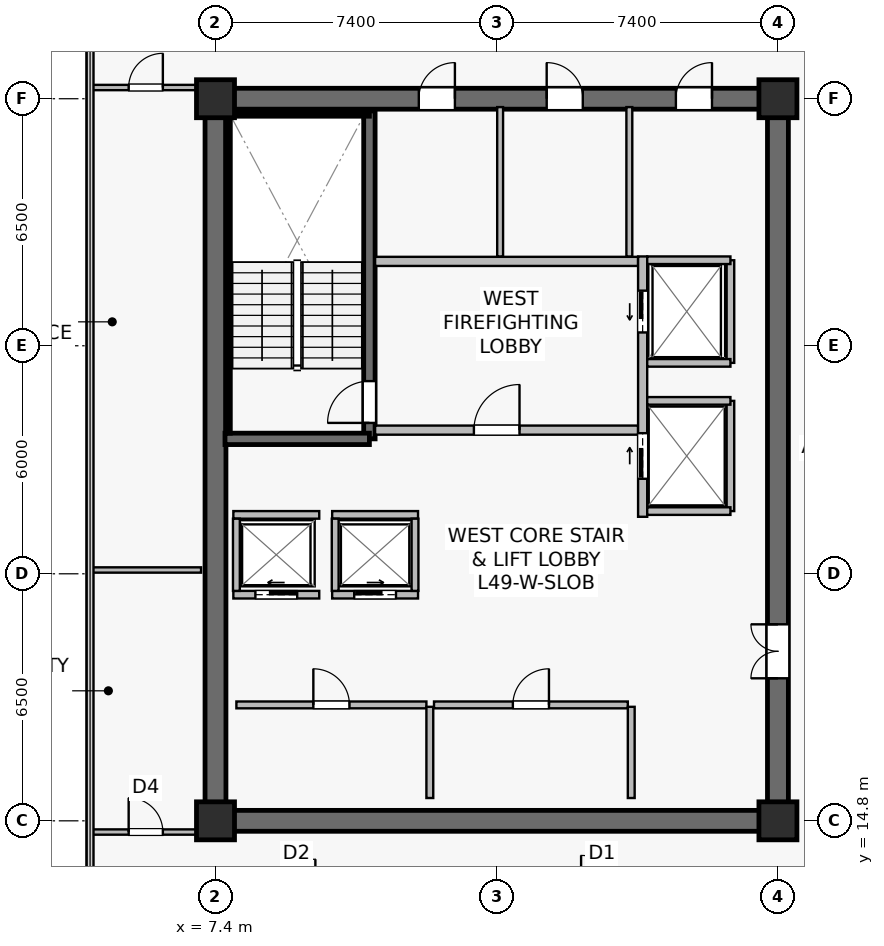
"""IFC4 building model, lengths in metres.
Left out: names, types, materials, properties, quantities, classifications, styles, units other than length and angle.
Written with IfcOpenShell. Run it as: python <this file> out.ifc"""

import sys

from ifc_helpers import new_model, si_unit, direction, frame, frame_2d, origin, origin_2d, place, context, subcontext, project, spatial, rectangle, extrude, source, transform, mapped, element, fill, save


model = new_model("IFC4")
c1 = context("Model", 3, precision=1e-05, world=origin(), true_north=direction((0.0, 1.0)))
c2 = subcontext(c1, "Body", "Model", "MODEL_VIEW")
j1 = project(units=[si_unit("LENGTHUNIT", "METRE"), si_unit("PLANEANGLEUNIT", "RADIAN")], contexts=[c1])
p1 = place(None, origin())
s1 = spatial("IfcSite", under=j1, at=p1, CompositionType="ELEMENT")
p2 = place(p1, origin())
s2 = spatial("IfcBuilding", under=s1, at=p2, CompositionType="ELEMENT")
p3 = place(p2, frame((0.0, 0.0, 205.5)))
s3 = spatial("IfcBuildingStorey", under=s2, at=p3, CompositionType="ELEMENT", Elevation=205.5)
p4 = place(p3, frame((7.125, 14.8, 0.0), z_axis=(0.0, 0.0, 1.0), x_axis=(1.0, 0.0, 0.0)))
e1 = element("IfcWall", 1, at=p4, inside=s3, PredefinedType="SHEAR", context=c2, shape_type="SweptSolid", body=[
    extrude(rectangle(XDim=15.35, YDim=0.55, at=frame_2d((7.675, 0.0))), origin(), (0.0, 0.0, 1.0), 3.8),
])
p5 = place(p3, frame((7.125, 33.8, 0.0), z_axis=(0.0, 0.0, 1.0), x_axis=(1.0, 0.0, 0.0)))
e2 = element("IfcWall", 2, at=p5, inside=s3, PredefinedType="SHEAR", context=c2, shape_type="SweptSolid", body=[
    extrude(rectangle(XDim=15.35, YDim=0.55, at=frame_2d((7.675, 0.0))), origin(), (0.0, 0.0, 1.0), 3.8),
])
p6 = place(p5, frame((5.625, 0.0, 0.0)))
e3 = element("IfcOpeningElement", 3, at=p6, cuts=e2, PredefinedType="OPENING", context=c2, shape_type="SweptSolid", body=[
    extrude(rectangle(XDim=0.95, YDim=2.15, at=frame_2d((0.475, 1.075))), frame((0.0, 0.285, 0.0), z_axis=(0.0, -1.0, 0.0), x_axis=(1.0, 0.0, 0.0)), (0.0, 0.0, 1.0), 0.57),
])
p7 = place(p5, frame((8.99, 0.0, 0.0)))
e4 = element("IfcOpeningElement", 4, at=p7, cuts=e2, PredefinedType="OPENING", context=c2, shape_type="SweptSolid", body=[
    extrude(rectangle(XDim=0.95, YDim=2.15, at=frame_2d((0.475, 1.075))), frame((0.0, 0.285, 0.0), z_axis=(0.0, -1.0, 0.0), x_axis=(1.0, 0.0, 0.0)), (0.0, 0.0, 1.0), 0.57),
])
p8 = place(p5, frame((12.39, 0.0, 0.0)))
e5 = element("IfcOpeningElement", 5, at=p8, cuts=e2, PredefinedType="OPENING", context=c2, shape_type="SweptSolid", body=[
    extrude(rectangle(XDim=0.95, YDim=2.15, at=frame_2d((0.475, 1.075))), frame((0.0, 0.285, 0.0), z_axis=(0.0, -1.0, 0.0), x_axis=(1.0, 0.0, 0.0)), (0.0, 0.0, 1.0), 0.57),
])
p9 = place(p3, frame((7.4, 15.075, 0.0), z_axis=(0.0, 0.0, 1.0), x_axis=(0.0, 1.0, 0.0)))
e6 = element("IfcWall", 6, at=p9, inside=s3, PredefinedType="SHEAR", context=c2, shape_type="SweptSolid", body=[
    extrude(rectangle(XDim=18.45, YDim=0.55, at=frame_2d((9.225, 0.0))), origin(), (0.0, 0.0, 1.0), 3.8),
])
p10 = place(p3, frame((22.2, 15.075, 0.0), z_axis=(0.0, 0.0, 1.0), x_axis=(0.0, 1.0, 0.0)))
e7 = element("IfcWall", 7, at=p10, inside=s3, PredefinedType="SHEAR", context=c2, shape_type="SweptSolid", body=[
    extrude(rectangle(XDim=18.45, YDim=0.55, at=frame_2d((9.225, 0.0))), origin(), (0.0, 0.0, 1.0), 3.8),
])
p11 = place(p10, frame((3.475, 0.0, 0.0)))
e8 = element("IfcOpeningElement", 8, at=p11, cuts=e7, PredefinedType="OPENING", context=c2, shape_type="SweptSolid", body=[
    extrude(rectangle(XDim=1.42, YDim=2.2, at=frame_2d((0.71, 1.1))), frame((0.0, 0.285, 0.0), z_axis=(0.0, -1.0, 0.0), x_axis=(1.0, 0.0, 0.0)), (0.0, 0.0, 1.0), 0.57),
])
p12 = place(p3, frame((11.45, 24.85, 0.0), z_axis=(0.0, 0.0, 1.0), x_axis=(0.0, 1.0, 0.0)))
e9 = element("IfcWall", 9, at=p12, inside=s3, PredefinedType="SHEAR", context=c2, shape_type="SweptSolid", body=[
    extrude(rectangle(XDim=8.63, YDim=0.3, at=frame_2d((4.315, 0.0))), origin(), (0.0, 0.0, 1.0), 3.8),
])
p13 = place(p12, frame((0.42, 0.0, 0.0)))
e10 = element("IfcOpeningElement", 10, at=p13, cuts=e9, PredefinedType="OPENING", context=c2, shape_type="SweptSolid", body=[
    extrude(rectangle(XDim=1.1, YDim=2.15, at=frame_2d((0.55, 1.075))), frame((0.0, 0.16, 0.0), z_axis=(0.0, -1.0, 0.0), x_axis=(1.0, 0.0, 0.0)), (0.0, 0.0, 1.0), 0.32),
])
p14 = place(p3, frame((7.65, 24.85, 0.0), z_axis=(0.0, 0.0, 1.0), x_axis=(1.0, 0.0, 0.0)))
e11 = element("IfcWall", 11, at=p14, inside=s3, PredefinedType="SHEAR", context=c2, shape_type="SweptSolid", body=[
    extrude(rectangle(XDim=3.8, YDim=0.3, at=frame_2d((1.9, 0.0))), origin(), (0.0, 0.0, 1.0), 3.8),
])
p15 = place(p3, frame((7.73, 33.4, 0.0), z_axis=(0.0, 0.0, 1.0), x_axis=(1.0, 0.0, 0.0)))
e12 = element("IfcWall", 12, at=p15, inside=s3, PredefinedType="SOLIDWALL", context=c2, shape_type="SweptSolid", body=[
    extrude(rectangle(XDim=3.72, YDim=0.12, at=frame_2d((1.86, 0.0))), origin(), (0.0, 0.0, 1.0), 3.8),
])
p16 = place(p3, frame((7.73, 25.0, 0.0), z_axis=(0.0, 0.0, 1.0), x_axis=(0.0, 1.0, 0.0)))
e13 = element("IfcWall", 13, at=p16, inside=s3, PredefinedType="SOLIDWALL", context=c2, shape_type="SweptSolid", body=[
    extrude(rectangle(XDim=8.32, YDim=0.12, at=frame_2d((4.16, 0.0))), origin(), (0.0, 0.0, 1.0), 3.8),
])
m1 = source(origin(), c2, "Body", "SweptSolid", [
    extrude(rectangle(XDim=1.0, YDim=1.0, at=origin_2d()), origin(), (0.0, 0.0, 1.0), 4.1),
])
for number, where, z_axis, x_axis in (
    (14, (7.4, 14.8, 0.0), (0.0, 0.0, 1.0), (1.0, 0.0, 0.0)),
    (15, (22.2, 14.8, 0.0), (0.0, 0.0, 1.0), (1.0, 0.0, 0.0)),
    (16, (7.4, 33.8, 0.0), (0.0, 0.0, 1.0), (1.0, 0.0, 0.0)),
    (17, (22.2, 33.8, 0.0), (0.0, 0.0, 1.0), (1.0, 0.0, 0.0)),
):
    element("IfcColumn", number, at=place(p3, frame(where, z_axis=z_axis, x_axis=x_axis)), inside=s3, PredefinedType="COLUMN", context=c2, shape_type="MappedRepresentation", body=[
        mapped(m1, transform((0.0, 0.0, 0.0), scale=1.0)),
    ])
p17 = place(p3, frame((11.6, 25.08, 0.0), z_axis=(0.0, 0.0, 1.0), x_axis=(1.0, 0.0, 0.0)))
e18 = element("IfcWall", 18, at=p17, inside=s3, PredefinedType="SOLIDWALL", context=c2, shape_type="SweptSolid", body=[
    extrude(rectangle(XDim=6.92, YDim=0.24, at=frame_2d((3.46, 0.0))), origin(), (0.0, 0.0, 1.0), 3.197),
])
p18 = place(p17, frame((2.6, 0.0, 0.0)))
e19 = element("IfcOpeningElement", 19, at=p18, cuts=e18, PredefinedType="OPENING", context=c2, shape_type="SweptSolid", body=[
    extrude(rectangle(XDim=1.2, YDim=2.16, at=frame_2d((0.6, 1.08))), frame((0.0, 0.13, 0.0), z_axis=(0.0, -1.0, 0.0), x_axis=(1.0, 0.0, 0.0)), (0.0, 0.0, 1.0), 0.26),
])
p19 = place(p3, frame((11.6, 29.52, 0.0), z_axis=(0.0, 0.0, 1.0), x_axis=(1.0, 0.0, 0.0)))
e20 = element("IfcWall", 20, at=p19, inside=s3, PredefinedType="SOLIDWALL", context=c2, shape_type="SweptSolid", body=[
    extrude(rectangle(XDim=6.92, YDim=0.24, at=frame_2d((3.46, 0.0))), origin(), (0.0, 0.0, 1.0), 3.197),
])
p20 = place(p3, frame((18.64, 22.8, 0.0), z_axis=(0.0, 0.0, 1.0), x_axis=(0.0, 1.0, 0.0)))
e21 = element("IfcWall", 21, at=p20, inside=s3, PredefinedType="SOLIDWALL", context=c2, shape_type="SweptSolid", body=[
    extrude(rectangle(XDim=6.85, YDim=0.24, at=frame_2d((3.425, 0.0))), origin(), (0.0, 0.0, 1.0), 2.935),
])
p21 = place(p20, frame((4.85, 0.0, 0.0)))
e22 = element("IfcOpeningElement", 22, at=p21, cuts=e21, PredefinedType="OPENING", context=c2, shape_type="SweptSolid", body=[
    extrude(rectangle(XDim=1.1, YDim=2.22, at=frame_2d((0.55, 1.11))), frame((0.0, 0.13, 0.0), z_axis=(0.0, -1.0, 0.0), x_axis=(1.0, 0.0, 0.0)), (0.0, 0.0, 1.0), 0.26),
])
p22 = place(p20, frame((1.0, 0.0, 0.0)))
e23 = element("IfcOpeningElement", 23, at=p22, cuts=e21, PredefinedType="OPENING", context=c2, shape_type="SweptSolid", body=[
    extrude(rectangle(XDim=1.2, YDim=2.22, at=frame_2d((0.6, 1.11))), frame((0.0, 0.13, 0.0), z_axis=(0.0, -1.0, 0.0), x_axis=(1.0, 0.0, 0.0)), (0.0, 0.0, 1.0), 0.26),
])
p23 = place(p3, frame((7.87, 20.75, 0.0), z_axis=(0.0, 0.0, 1.0), x_axis=(1.0, 0.0, 0.0)))
e24 = element("IfcWall", 24, at=p23, inside=s3, PredefinedType="SOLIDWALL", context=c2, shape_type="SweptSolid", body=[
    extrude(rectangle(XDim=2.26, YDim=0.2, at=frame_2d((1.13, 0.0))), origin(), (0.0, 0.0, 1.0), 3.8),
])
p24 = place(p23, frame((0.58, 0.0, 0.0)))
e25 = element("IfcOpeningElement", 25, at=p24, cuts=e24, PredefinedType="OPENING", context=c2, shape_type="SweptSolid", body=[
    extrude(rectangle(XDim=1.1, YDim=2.22, at=frame_2d((0.55, 1.11))), frame((0.0, 0.11, 0.0), z_axis=(0.0, -1.0, 0.0), x_axis=(1.0, 0.0, 0.0)), (0.0, 0.0, 1.0), 0.22),
])
p25 = place(p3, frame((7.87, 22.85, 0.0), z_axis=(0.0, 0.0, 1.0), x_axis=(1.0, 0.0, 0.0)))
e26 = element("IfcWall", 26, at=p25, inside=s3, PredefinedType="SOLIDWALL", context=c2, shape_type="SweptSolid", body=[
    extrude(rectangle(XDim=2.26, YDim=0.2, at=frame_2d((1.13, 0.0))), origin(), (0.0, 0.0, 1.0), 3.8),
])
p26 = place(p3, frame((7.95, 20.85, 0.0), z_axis=(0.0, 0.0, 1.0), x_axis=(0.0, 1.0, 0.0)))
e27 = element("IfcWall", 27, at=p26, inside=s3, PredefinedType="SOLIDWALL", context=c2, shape_type="SweptSolid", body=[
    extrude(rectangle(XDim=1.9, YDim=0.18, at=frame_2d((0.95, 0.0))), origin(), (0.0, 0.0, 1.0), 3.8),
])
p27 = place(p3, frame((10.47, 20.75, 0.0), z_axis=(0.0, 0.0, 1.0), x_axis=(1.0, 0.0, 0.0)))
e28 = element("IfcWall", 28, at=p27, inside=s3, PredefinedType="SOLIDWALL", context=c2, shape_type="SweptSolid", body=[
    extrude(rectangle(XDim=2.26, YDim=0.2, at=frame_2d((1.13, 0.0))), origin(), (0.0, 0.0, 1.0), 3.8),
])
p28 = place(p27, frame((0.58, 0.0, 0.0)))
e29 = element("IfcOpeningElement", 29, at=p28, cuts=e28, PredefinedType="OPENING", context=c2, shape_type="SweptSolid", body=[
    extrude(rectangle(XDim=1.1, YDim=2.22, at=frame_2d((0.55, 1.11))), frame((0.0, 0.11, 0.0), z_axis=(0.0, -1.0, 0.0), x_axis=(1.0, 0.0, 0.0)), (0.0, 0.0, 1.0), 0.22),
])
p29 = place(p3, frame((10.47, 22.85, 0.0), z_axis=(0.0, 0.0, 1.0), x_axis=(1.0, 0.0, 0.0)))
e30 = element("IfcWall", 30, at=p29, inside=s3, PredefinedType="SOLIDWALL", context=c2, shape_type="SweptSolid", body=[
    extrude(rectangle(XDim=2.26, YDim=0.2, at=frame_2d((1.13, 0.0))), origin(), (0.0, 0.0, 1.0), 3.8),
])
for number, where, z_axis, x_axis in (
    (31, (10.55, 20.85, 0.0), (0.0, 0.0, 1.0), (0.0, 1.0, 0.0)),
    (32, (12.65, 20.85, 0.0), (0.0, 0.0, 1.0), (0.0, 1.0, 0.0)),
):
    element("IfcWall", number, at=place(p3, frame(where, z_axis=z_axis, x_axis=x_axis)), inside=s3, PredefinedType="SOLIDWALL", context=c2, shape_type="SweptSolid", body=[
        extrude(rectangle(XDim=1.9, YDim=0.18, at=frame_2d((0.95, 0.0))), origin(), (0.0, 0.0, 1.0), 3.8),
    ])
p30 = place(p3, frame((20.95, 26.85, 0.0), z_axis=(0.0, 0.0, 1.0), x_axis=(0.0, 1.0, 0.0)))
e33 = element("IfcWall", 33, at=p30, inside=s3, PredefinedType="SOLIDWALL", context=c2, shape_type="SweptSolid", body=[
    extrude(rectangle(XDim=2.7, YDim=0.2, at=frame_2d((1.35, 0.0))), origin(), (0.0, 0.0, 1.0), 3.8),
])
p31 = place(p3, frame((18.76, 29.55, 0.0), z_axis=(0.0, 0.0, 1.0), x_axis=(1.0, 0.0, 0.0)))
e34 = element("IfcWall", 34, at=p31, inside=s3, PredefinedType="SOLIDWALL", context=c2, shape_type="SweptSolid", body=[
    extrude(rectangle(XDim=2.19, YDim=0.2, at=frame_2d((1.095, 0.0))), origin(), (0.0, 0.0, 1.0), 3.8),
])
p32 = place(p3, frame((18.76, 26.85, 0.0), z_axis=(0.0, 0.0, 1.0), x_axis=(1.0, 0.0, 0.0)))
e35 = element("IfcWall", 35, at=p32, inside=s3, PredefinedType="SOLIDWALL", context=c2, shape_type="SweptSolid", body=[
    extrude(rectangle(XDim=2.19, YDim=0.2, at=frame_2d((1.095, 0.0))), origin(), (0.0, 0.0, 1.0), 3.197),
])
p33 = place(p3, frame((20.95, 22.95, 0.0), z_axis=(0.0, 0.0, 1.0), x_axis=(0.0, 1.0, 0.0)))
e36 = element("IfcWall", 36, at=p33, inside=s3, PredefinedType="SOLIDWALL", context=c2, shape_type="SweptSolid", body=[
    extrude(rectangle(XDim=2.9, YDim=0.2, at=frame_2d((1.45, 0.0))), origin(), (0.0, 0.0, 1.0), 2.935),
])
for number, where, z_axis, x_axis in (
    (37, (18.76, 25.85, 0.0), (0.0, 0.0, 1.0), (1.0, 0.0, 0.0)),
    (38, (18.76, 22.95, 0.0), (0.0, 0.0, 1.0), (1.0, 0.0, 0.0)),
):
    element("IfcWall", number, at=place(p3, frame(where, z_axis=z_axis, x_axis=x_axis)), inside=s3, PredefinedType="SOLIDWALL", context=c2, shape_type="SweptSolid", body=[
        extrude(rectangle(XDim=2.19, YDim=0.2, at=frame_2d((1.095, 0.0))), origin(), (0.0, 0.0, 1.0), 3.8),
    ])
p34 = place(p3, frame((7.95, 17.85, 0.0), z_axis=(0.0, 0.0, 1.0), x_axis=(1.0, 0.0, 0.0)))
e39 = element("IfcWall", 39, at=p34, inside=s3, PredefinedType="SOLIDWALL", context=c2, shape_type="SweptSolid", body=[
    extrude(rectangle(XDim=5.0, YDim=0.18, at=frame_2d((2.5, 0.0))), origin(), (0.0, 0.0, 1.0), 3.8),
])
p35 = place(p34, frame((2.025, 0.0, 0.0)))
e40 = element("IfcOpeningElement", 40, at=p35, cuts=e39, PredefinedType="OPENING", context=c2, shape_type="SweptSolid", body=[
    extrude(rectangle(XDim=0.95, YDim=2.15, at=frame_2d((0.475, 1.075))), frame((0.0, 0.1, 0.0), z_axis=(0.0, -1.0, 0.0), x_axis=(1.0, 0.0, 0.0)), (0.0, 0.0, 1.0), 0.2),
])
p36 = place(p3, frame((13.04, 15.4, 0.0), z_axis=(0.0, 0.0, 1.0), x_axis=(0.0, 1.0, 0.0)))
e41 = element("IfcWall", 41, at=p36, inside=s3, PredefinedType="SOLIDWALL", context=c2, shape_type="SweptSolid", body=[
    extrude(rectangle(XDim=2.4, YDim=0.18, at=frame_2d((1.2, 0.0))), origin(), (0.0, 0.0, 1.0), 3.8),
])
p37 = place(p3, frame((13.15, 17.85, 0.0), z_axis=(0.0, 0.0, 1.0), x_axis=(1.0, 0.0, 0.0)))
e42 = element("IfcWall", 42, at=p37, inside=s3, PredefinedType="SOLIDWALL", context=c2, shape_type="SweptSolid", body=[
    extrude(rectangle(XDim=5.1, YDim=0.18, at=frame_2d((2.55, 0.0))), origin(), (0.0, 0.0, 1.0), 3.197),
])
p38 = place(p37, frame((2.075, 0.0, 0.0)))
e43 = element("IfcOpeningElement", 43, at=p38, cuts=e42, PredefinedType="OPENING", context=c2, shape_type="SweptSolid", body=[
    extrude(rectangle(XDim=0.95, YDim=2.15, at=frame_2d((0.475, 1.075))), frame((0.0, 0.1, 0.0), z_axis=(0.0, -1.0, 0.0), x_axis=(1.0, 0.0, 0.0)), (0.0, 0.0, 1.0), 0.2),
])
p39 = place(p3, frame((18.34, 15.4, 0.0), z_axis=(0.0, 0.0, 1.0), x_axis=(0.0, 1.0, 0.0)))
e44 = element("IfcWall", 44, at=p39, inside=s3, PredefinedType="SOLIDWALL", context=c2, shape_type="SweptSolid", body=[
    extrude(rectangle(XDim=2.4, YDim=0.18, at=frame_2d((1.2, 0.0))), origin(), (0.0, 0.0, 1.0), 3.8),
])
p40 = place(p3, frame((14.89, 29.65, 0.0), z_axis=(0.0, 0.0, 1.0), x_axis=(0.0, 1.0, 0.0)))
e45 = element("IfcWall", 45, at=p40, inside=s3, PredefinedType="PLUMBINGWALL", context=c2, shape_type="SweptSolid", body=[
    extrude(rectangle(XDim=3.93, YDim=0.155, at=frame_2d((1.965, 0.0))), origin(), (0.0, 0.0, 1.0), 3.197),
])
p41 = place(p3, frame((18.29, 29.65, 0.0), z_axis=(0.0, 0.0, 1.0), x_axis=(0.0, 1.0, 0.0)))
e46 = element("IfcWall", 46, at=p41, inside=s3, PredefinedType="PLUMBINGWALL", context=c2, shape_type="SweptSolid", body=[
    extrude(rectangle(XDim=3.93, YDim=0.155, at=frame_2d((1.965, 0.0))), origin(), (0.0, 0.0, 1.0), 3.8),
])
p42 = place(p3, frame((4.11, 21.4, 0.0), z_axis=(0.0, 0.0, 1.0), x_axis=(1.0, 0.0, 0.0)))
e47 = element("IfcWall", 47, at=p42, inside=s3, PredefinedType="PARTITIONING", context=c2, shape_type="SweptSolid", body=[
    extrude(rectangle(XDim=2.91, YDim=0.14, at=frame_2d((1.455, 0.0))), origin(), (0.0, 0.0, 1.0), 3.8),
])
p43 = place(p3, frame((4.11, 14.505, 0.0), z_axis=(0.0, 0.0, 1.0), x_axis=(1.0, 0.0, 0.0)))
e48 = element("IfcWall", 48, at=p43, inside=s3, PredefinedType="PARTITIONING", context=c2, shape_type="SweptSolid", body=[
    extrude(rectangle(XDim=2.91, YDim=0.14, at=frame_2d((1.455, 0.0))), origin(), (0.0, 0.0, 1.0), 3.8),
])
p44 = place(p43, frame((1.005, 0.0, 0.0)))
e49 = element("IfcOpeningElement", 49, at=p44, cuts=e48, PredefinedType="OPENING", context=c2, shape_type="SweptSolid", body=[
    extrude(rectangle(XDim=0.9, YDim=2.1, at=frame_2d((0.45, 1.05))), frame((0.0, 0.08, 0.0), z_axis=(0.0, -1.0, 0.0), x_axis=(1.0, 0.0, 0.0)), (0.0, 0.0, 1.0), 0.16),
])
p45 = place(p3, frame((4.11, 34.095, 0.0), z_axis=(0.0, 0.0, 1.0), x_axis=(1.0, 0.0, 0.0)))
e50 = element("IfcWall", 50, at=p45, inside=s3, PredefinedType="PARTITIONING", context=c2, shape_type="SweptSolid", body=[
    extrude(rectangle(XDim=2.91, YDim=0.14, at=frame_2d((1.455, 0.0))), origin(), (0.0, 0.0, 1.0), 3.8),
])
p46 = place(p45, frame((1.005, 0.0, 0.0)))
e51 = element("IfcOpeningElement", 51, at=p46, cuts=e50, PredefinedType="OPENING", context=c2, shape_type="SweptSolid", body=[
    extrude(rectangle(XDim=0.9, YDim=2.1, at=frame_2d((0.45, 1.05))), frame((0.0, 0.08, 0.0), z_axis=(0.0, -1.0, 0.0), x_axis=(1.0, 0.0, 0.0)), (0.0, 0.0, 1.0), 0.16),
])
m2 = source(origin(), c2, "Body", "SweptSolid", [
    extrude(rectangle(XDim=1.1, YDim=2.15, at=frame_2d((0.55, 1.075))), frame((0.0, 0.025, 0.0), z_axis=(0.0, -1.0, 0.0), x_axis=(1.0, 0.0, 0.0)), (0.0, 0.0, 1.0), 0.05),
])
p47 = place(p13, origin())
e52 = element("IfcDoor", 52, at=p47, inside=s3, OperationType="SINGLE_SWING_LEFT", PredefinedType="DOOR", context=c2, shape_type="MappedRepresentation", body=[
    mapped(m2, transform((0.0, 0.0, 0.0), scale=1.0)),
])
fill(e10, e52)
m3 = source(origin(), c2, "Body", "SweptSolid", [
    extrude(rectangle(XDim=1.2, YDim=2.16, at=frame_2d((0.6, 1.08))), frame((0.0, 0.025, 0.0), z_axis=(0.0, -1.0, 0.0), x_axis=(1.0, 0.0, 0.0)), (0.0, 0.0, 1.0), 0.05),
])
p48 = place(p18, origin())
e53 = element("IfcDoor", 53, at=p48, inside=s3, OperationType="SINGLE_SWING_RIGHT", PredefinedType="DOOR", context=c2, shape_type="MappedRepresentation", body=[
    mapped(m3, transform((0.0, 0.0, 0.0), scale=1.0)),
])
fill(e19, e53)
m4 = source(origin(), c2, "Body", "SweptSolid", [
    extrude(rectangle(XDim=1.1, YDim=2.22, at=frame_2d((0.55, 1.11))), frame((0.0, 0.025, 0.0), z_axis=(0.0, -1.0, 0.0), x_axis=(1.0, 0.0, 0.0)), (0.0, 0.0, 1.0), 0.05),
])
p49 = place(p24, origin())
e54 = element("IfcDoor", 54, at=p49, inside=s3, OperationType="SLIDING_TO_LEFT", PredefinedType="USERDEFINED", context=c2, shape_type="MappedRepresentation", body=[
    mapped(m4, transform((0.0, 0.0, 0.0), scale=1.0)),
])
fill(e25, e54)
p50 = place(p28, origin())
e55 = element("IfcDoor", 55, at=p50, inside=s3, OperationType="SLIDING_TO_RIGHT", PredefinedType="USERDEFINED", context=c2, shape_type="MappedRepresentation", body=[
    mapped(m4, transform((0.0, 0.0, 0.0), scale=1.0)),
])
fill(e29, e55)
p51 = place(p21, origin())
e56 = element("IfcDoor", 56, at=p51, inside=s3, OperationType="SLIDING_TO_LEFT", PredefinedType="USERDEFINED", context=c2, shape_type="MappedRepresentation", body=[
    mapped(m4, transform((0.0, 0.0, 0.0), scale=1.0)),
])
fill(e22, e56)
m5 = source(origin(), c2, "Body", "SweptSolid", [
    extrude(rectangle(XDim=1.2, YDim=2.22, at=frame_2d((0.6, 1.11))), frame((0.0, 0.025, 0.0), z_axis=(0.0, -1.0, 0.0), x_axis=(1.0, 0.0, 0.0)), (0.0, 0.0, 1.0), 0.05),
])
p52 = place(p22, origin())
e57 = element("IfcDoor", 57, at=p52, inside=s3, OperationType="SLIDING_TO_RIGHT", PredefinedType="USERDEFINED", context=c2, shape_type="MappedRepresentation", body=[
    mapped(m5, transform((0.0, 0.0, 0.0), scale=1.0)),
])
fill(e23, e57)
m6 = source(origin(), c2, "Body", "SweptSolid", [
    extrude(rectangle(XDim=0.95, YDim=2.15, at=frame_2d((0.475, 1.075))), frame((0.0, 0.025, 0.0), z_axis=(0.0, -1.0, 0.0), x_axis=(1.0, 0.0, 0.0)), (0.0, 0.0, 1.0), 0.05),
])
p53 = place(p35, origin())
e58 = element("IfcDoor", 58, at=p53, inside=s3, OperationType="SINGLE_SWING_LEFT", PredefinedType="DOOR", context=c2, shape_type="MappedRepresentation", body=[
    mapped(m6, transform((0.0, 0.0, 0.0), scale=1.0)),
])
fill(e40, e58)
p54 = place(p38, origin())
e59 = element("IfcDoor", 59, at=p54, inside=s3, OperationType="SINGLE_SWING_RIGHT", PredefinedType="DOOR", context=c2, shape_type="MappedRepresentation", body=[
    mapped(m6, transform((0.0, 0.0, 0.0), scale=1.0)),
])
fill(e43, e59)
m7 = source(origin(), c2, "Body", "SweptSolid", [
    extrude(rectangle(XDim=1.42, YDim=2.2, at=frame_2d((0.71, 1.1))), frame((0.0, 0.025, 0.0), z_axis=(0.0, -1.0, 0.0), x_axis=(1.0, 0.0, 0.0)), (0.0, 0.0, 1.0), 0.05),
])
p55 = place(p11, origin())
e60 = element("IfcDoor", 60, at=p55, inside=s3, OperationType="DOUBLE_DOOR_SINGLE_SWING", PredefinedType="DOOR", context=c2, shape_type="MappedRepresentation", body=[
    mapped(m7, transform((0.0, 0.0, 0.0), scale=1.0)),
])
fill(e8, e60)
p56 = place(p6, origin())
e61 = element("IfcDoor", 61, at=p56, inside=s3, OperationType="SINGLE_SWING_RIGHT", PredefinedType="DOOR", context=c2, shape_type="MappedRepresentation", body=[
    mapped(m6, transform((0.0, 0.0, 0.0), scale=1.0)),
])
fill(e3, e61)
p57 = place(p7, origin())
e62 = element("IfcDoor", 62, at=p57, inside=s3, OperationType="SINGLE_SWING_LEFT", PredefinedType="DOOR", context=c2, shape_type="MappedRepresentation", body=[
    mapped(m6, transform((0.0, 0.0, 0.0), scale=1.0)),
])
fill(e4, e62)
p58 = place(p8, origin())
e63 = element("IfcDoor", 63, at=p58, inside=s3, OperationType="SINGLE_SWING_RIGHT", PredefinedType="DOOR", context=c2, shape_type="MappedRepresentation", body=[
    mapped(m6, transform((0.0, 0.0, 0.0), scale=1.0)),
])
fill(e5, e63)
m8 = source(origin(), c2, "Body", "SweptSolid", [
    extrude(rectangle(XDim=0.9, YDim=2.1, at=frame_2d((0.45, 1.05))), frame((0.0, 0.025, 0.0), z_axis=(0.0, -1.0, 0.0), x_axis=(1.0, 0.0, 0.0)), (0.0, 0.0, 1.0), 0.05),
])
p59 = place(p44, origin())
e64 = element("IfcDoor", 64, at=p59, inside=s3, OperationType="SINGLE_SWING_LEFT", PredefinedType="DOOR", context=c2, shape_type="MappedRepresentation", body=[
    mapped(m8, transform((0.0, 0.0, 0.0), scale=1.0)),
])
fill(e49, e64)
p60 = place(p46, origin())
e65 = element("IfcDoor", 65, at=p60, inside=s3, OperationType="SINGLE_SWING_RIGHT", PredefinedType="DOOR", context=c2, shape_type="MappedRepresentation", body=[
    mapped(m8, transform((0.0, 0.0, 0.0), scale=1.0)),
])
fill(e51, e65)
save(model, sys.argv[1])
